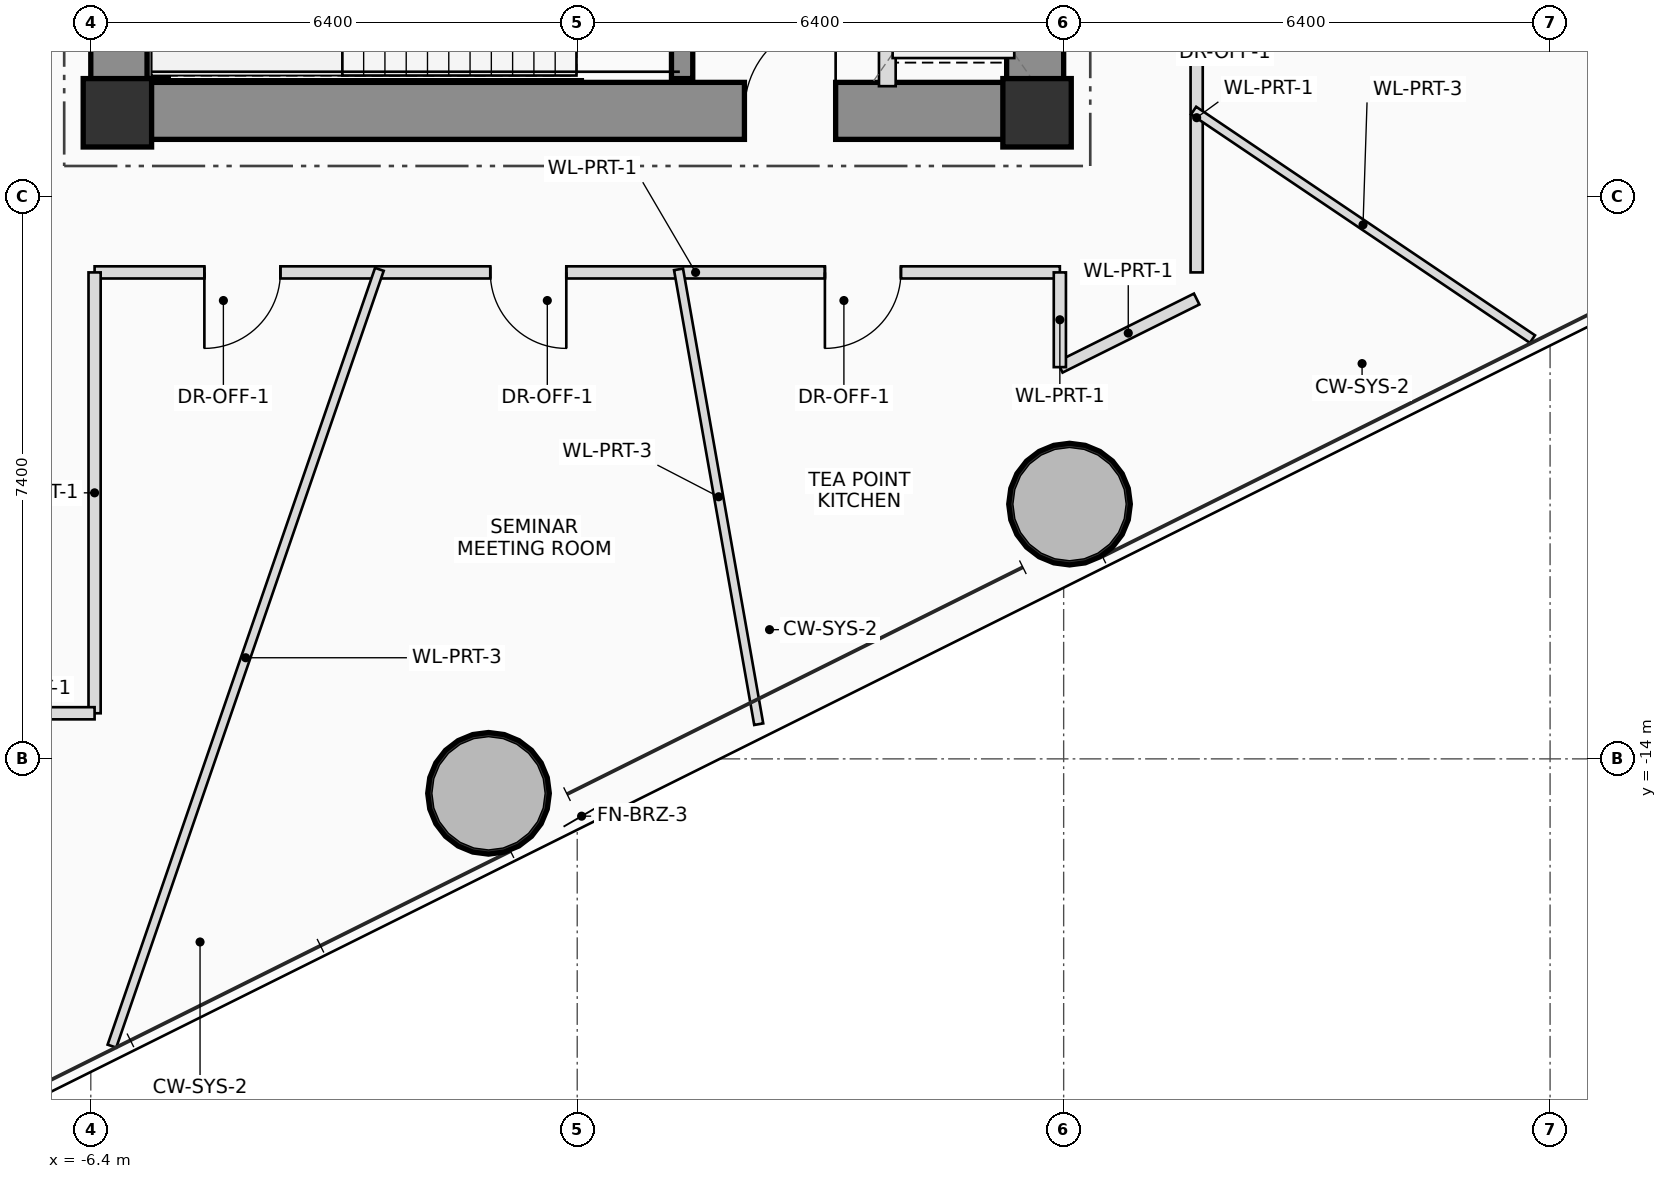
"""IFC4 building model, lengths in metres.
Left out: names, types, materials, properties, quantities, classifications, styles, units other than length and angle.
Written with IfcOpenShell. Run it as: python <this file> out.ifc"""

import sys

from ifc_helpers import new_model, si_unit, direction, frame, frame_2d, origin, origin_2d, place, context, subcontext, project, spatial, rectangle, hollow_circle, extrude, source, transform, mapped, element, fill, save


model = new_model("IFC4")
c1 = context("Model", 3, precision=1e-05, world=origin(), true_north=direction((0.0, 1.0)))
c2 = subcontext(c1, "Body", "Model", "MODEL_VIEW")
j1 = project(units=[si_unit("LENGTHUNIT", "METRE"), si_unit("PLANEANGLEUNIT", "RADIAN")], contexts=[c1])
p1 = place(None, origin())
s1 = spatial("IfcSite", under=j1, at=p1, CompositionType="ELEMENT")
p2 = place(p1, origin())
s2 = spatial("IfcBuilding", under=s1, at=p2, CompositionType="ELEMENT")
p3 = place(p2, frame((0.0, 0.0, 46.0)))
s3 = spatial("IfcBuildingStorey", under=s2, at=p3, CompositionType="ELEMENT", Elevation=46.0)
m1 = source(origin(), c2, "Body", "SweptSolid", [
    extrude(rectangle(XDim=0.9, YDim=0.9, at=origin_2d()), origin(), (0.0, 0.0, 1.0), 3.7),
])
for number, where, z_axis, x_axis in (
    (1, (-6.05, -5.5, 0.0), (0.0, 0.0, 1.0), (1.0, 0.0, 0.0)),
    (2, (6.05, -5.5, 0.0), (0.0, 0.0, 1.0), (1.0, 0.0, 0.0)),
):
    element("IfcColumn", number, at=place(p3, frame(where, z_axis=z_axis, x_axis=x_axis)), inside=s3, PredefinedType="COLUMN", context=c2, shape_type="MappedRepresentation", body=[
        mapped(m1, transform((0.0, 0.0, 0.0), scale=1.0)),
    ])
p4 = place(p3, frame((-6.4, -5.475, 0.0), z_axis=(0.0, 0.0, 1.0), x_axis=(1.0, 0.0, 0.0)))
e3 = element("IfcWall", 3, at=p4, inside=s3, PredefinedType="SHEAR", context=c2, shape_type="SweptSolid", body=[
    extrude(rectangle(XDim=12.8, YDim=0.75, at=frame_2d((6.4, 0.0))), origin(), (0.0, 0.0, 1.0), 3.7),
])
p5 = place(p4, frame((8.6, 0.0, 0.0)))
e4 = element("IfcOpeningElement", 4, at=p5, cuts=e3, PredefinedType="OPENING", context=c2, shape_type="SweptSolid", body=[
    extrude(rectangle(XDim=1.2, YDim=2.2, at=frame_2d((0.6, 1.1))), frame((0.0, 0.385, 0.0), z_axis=(0.0, -1.0, 0.0), x_axis=(1.0, 0.0, 0.0)), (0.0, 0.0, 1.0), 0.77),
])
p6 = place(p3, frame((6.025, -5.1, 0.0), z_axis=(0.0, 0.0, 1.0), x_axis=(0.0, 1.0, 0.0)))
e5 = element("IfcWall", 5, at=p6, inside=s3, PredefinedType="SHEAR", context=c2, shape_type="SweptSolid", body=[
    extrude(rectangle(XDim=10.2, YDim=0.75, at=frame_2d((5.1, 0.0))), origin(), (0.0, 0.0, 1.0), 3.7),
])
p7 = place(p3, frame((-6.025, -5.1, 0.0), z_axis=(0.0, 0.0, 1.0), x_axis=(0.0, 1.0, 0.0)))
e6 = element("IfcWall", 6, at=p7, inside=s3, PredefinedType="SHEAR", context=c2, shape_type="SweptSolid", body=[
    extrude(rectangle(XDim=3.35, YDim=0.75, at=frame_2d((1.675, 0.0))), origin(), (0.0, 0.0, 1.0), 3.7),
])
p8 = place(p3, frame((-5.52, -5.05, 0.0), z_axis=(0.0, 0.0, 1.0), x_axis=(0.0, 1.0, 0.0)))
e7 = element("IfcWall", 7, at=p8, inside=s3, PredefinedType="SHEAR", context=c2, shape_type="SweptSolid", body=[
    extrude(rectangle(XDim=2.75, YDim=0.28, at=frame_2d((1.375, 0.0))), origin(), (0.0, 0.0, 1.0), 3.7),
])
p9 = place(p3, frame((1.38, -5.05, 0.0), z_axis=(0.0, 0.0, 1.0), x_axis=(0.0, 1.0, 0.0)))
e8 = element("IfcWall", 8, at=p9, inside=s3, PredefinedType="SHEAR", context=c2, shape_type="SweptSolid", body=[
    extrude(rectangle(XDim=0.8, YDim=0.28, at=frame_2d((0.4, 0.0))), origin(), (0.0, 0.0, 1.0), 3.7),
])
m2 = source(origin(), c2, "Body", "SweptSolid", [
    extrude(hollow_circle(Radius=0.8, WallThickness=0.055, at=origin_2d()), origin(), (0.0, 0.0, 1.0), 3.7),
])
for number, where, z_axis, x_axis in (
    (9, (-1.167, -14.453, 0.0), (0.0, 0.0, 1.0), (1.0, 0.0, 0.0)),
    (10, (6.477, -10.648, 0.0), (0.0, 0.0, 1.0), (1.0, 0.0, 0.0)),
):
    element("IfcColumn", number, at=place(p3, frame(where, z_axis=z_axis, x_axis=x_axis)), inside=s3, PredefinedType="COLUMN", context=c2, shape_type="MappedRepresentation", body=[
        mapped(m2, transform((0.0, 0.0, 0.0), scale=1.0)),
    ])
p10 = place(p3, frame((4.08, -5.15, 0.0), z_axis=(0.0, 0.0, 1.0), x_axis=(0.0, 1.0, 0.0)))
e11 = element("IfcWall", 11, at=p10, inside=s3, PredefinedType="PLUMBINGWALL", context=c2, shape_type="SweptSolid", body=[
    extrude(rectangle(XDim=2.95, YDim=0.22, at=frame_2d((1.475, 0.0))), origin(), (0.0, 0.0, 1.0), 3.46),
])
p11 = place(p10, frame((0.95, 0.0, 0.0)))
e12 = element("IfcOpeningElement", 12, at=p11, cuts=e11, PredefinedType="OPENING", context=c2, shape_type="SweptSolid", body=[
    extrude(rectangle(XDim=1.2, YDim=2.25, at=frame_2d((0.6, 1.125))), frame((0.0, 0.12, 0.0), z_axis=(0.0, -1.0, 0.0), x_axis=(1.0, 0.0, 0.0)), (0.0, 0.0, 1.0), 0.24),
])
p12 = place(p3, frame((6.35, -7.6, 0.0), z_axis=(0.0, 0.0, 1.0), x_axis=(-1.0, 0.0, 0.0)))
e13 = element("IfcWall", 13, at=p12, inside=s3, PredefinedType="PARTITIONING", context=c2, shape_type="SweptSolid", body=[
    extrude(rectangle(XDim=12.7, YDim=0.16, at=frame_2d((6.35, 0.0))), origin(), (0.0, 0.0, 1.0), 2.765),
])
p13 = place(p12, frame((2.091, 0.0, 0.0)))
e14 = element("IfcOpeningElement", 14, at=p13, cuts=e13, PredefinedType="OPENING", context=c2, shape_type="SweptSolid", body=[
    extrude(rectangle(XDim=1.0, YDim=2.25, at=frame_2d((0.5, 1.125))), frame((0.0, 0.09, 0.0), z_axis=(0.0, -1.0, 0.0), x_axis=(1.0, 0.0, 0.0)), (0.0, 0.0, 1.0), 0.18),
])
p14 = place(p12, frame((6.494, 0.0, 0.0)))
e15 = element("IfcOpeningElement", 15, at=p14, cuts=e13, PredefinedType="OPENING", context=c2, shape_type="SweptSolid", body=[
    extrude(rectangle(XDim=1.0, YDim=2.25, at=frame_2d((0.5, 1.125))), frame((0.0, 0.09, 0.0), z_axis=(0.0, -1.0, 0.0), x_axis=(1.0, 0.0, 0.0)), (0.0, 0.0, 1.0), 0.18),
])
p15 = place(p12, frame((10.256, 0.0, 0.0)))
e16 = element("IfcOpeningElement", 16, at=p15, cuts=e13, PredefinedType="OPENING", context=c2, shape_type="SweptSolid", body=[
    extrude(rectangle(XDim=1.0, YDim=2.25, at=frame_2d((0.5, 1.125))), frame((0.0, 0.09, 0.0), z_axis=(0.0, -1.0, 0.0), x_axis=(1.0, 0.0, 0.0)), (0.0, 0.0, 1.0), 0.18),
])
p16 = place(p3, frame((-6.35, -7.6, 0.0), z_axis=(0.0, 0.0, 1.0), x_axis=(0.0, -1.0, 0.0)))
e17 = element("IfcWall", 17, at=p16, inside=s3, PredefinedType="PARTITIONING", context=c2, shape_type="SweptSolid", body=[
    extrude(rectangle(XDim=5.8, YDim=0.16, at=frame_2d((2.9, 0.0))), origin(), (0.0, 0.0, 1.0), 2.765),
])
p17 = place(p3, frame((-6.35, -13.4, 0.0), z_axis=(0.0, 0.0, 1.0), x_axis=(-1.0, 0.0, 0.0)))
e18 = element("IfcWall", 18, at=p17, inside=s3, PredefinedType="PARTITIONING", context=c2, shape_type="SweptSolid", body=[
    extrude(rectangle(XDim=1.8, YDim=0.16, at=frame_2d((0.9, 0.0))), origin(), (0.0, 0.0, 1.0), 2.765),
])
p18 = place(p3, frame((8.15, -0.02, 0.0), z_axis=(0.0, 0.0, 1.0), x_axis=(0.0, -1.0, 0.0)))
e19 = element("IfcWall", 19, at=p18, inside=s3, PredefinedType="PARTITIONING", context=c2, shape_type="SweptSolid", body=[
    extrude(rectangle(XDim=7.58, YDim=0.16, at=frame_2d((3.79, 0.0))), origin(), (0.0, 0.0, 1.0), 2.765),
])
p19 = place(p18, frame((2.359, 0.0, 0.0)))
e20 = element("IfcOpeningElement", 20, at=p19, cuts=e19, PredefinedType="OPENING", context=c2, shape_type="SweptSolid", body=[
    extrude(rectangle(XDim=1.0, YDim=2.25, at=frame_2d((0.5, 1.125))), frame((0.0, 0.09, 0.0), z_axis=(0.0, -1.0, 0.0), x_axis=(1.0, 0.0, 0.0)), (0.0, 0.0, 1.0), 0.18),
])
p20 = place(p3, frame((8.15, -7.95, 0.0), z_axis=(0.0, 0.0, 1.0), x_axis=(-0.895251454268, -0.445561256879, 0.0)))
e21 = element("IfcWall", 21, at=p20, inside=s3, PredefinedType="PARTITIONING", context=c2, shape_type="SweptSolid", body=[
    extrude(rectangle(XDim=2.01, YDim=0.16, at=frame_2d((1.005, 0.0))), origin(), (0.0, 0.0, 1.0), 2.765),
])
p21 = place(p3, frame((6.35, -8.846, 0.0), z_axis=(0.0, 0.0, 1.0), x_axis=(0.0, 1.0, 0.0)))
e22 = element("IfcWall", 22, at=p21, inside=s3, PredefinedType="PARTITIONING", context=c2, shape_type="SweptSolid", body=[
    extrude(rectangle(XDim=1.246, YDim=0.16, at=frame_2d((0.623, 0.0))), origin(), (0.0, 0.0, 1.0), 2.765),
])
p22 = place(p3, frame((-2.603, -7.56, 0.0), z_axis=(0.0, 0.0, 1.0), x_axis=(-0.325570875914, -0.945517638522, 0.0)))
e23 = element("IfcWall", 23, at=p22, inside=s3, PredefinedType="PARTITIONING", context=c2, shape_type="SweptSolid", body=[
    extrude(rectangle(XDim=10.808, YDim=0.12, at=frame_2d((5.404, 0.0))), origin(), (0.0, 0.0, 1.0), 2.765),
])
p23 = place(p3, frame((1.333, -7.56, 0.0), z_axis=(0.0, 0.0, 1.0), x_axis=(0.173663844644, -0.984804990373, 0.0)))
e24 = element("IfcWall", 24, at=p23, inside=s3, PredefinedType="PARTITIONING", context=c2, shape_type="SweptSolid", body=[
    extrude(rectangle(XDim=6.076, YDim=0.12, at=frame_2d((3.038, 0.0))), origin(), (0.0, 0.0, 1.0), 2.925),
])
p24 = place(p3, frame((8.11, -5.47, 0.0), z_axis=(0.0, 0.0, 1.0), x_axis=(0.829034436431, -0.559197552938, 0.0)))
e25 = element("IfcWall", 25, at=p24, inside=s3, PredefinedType="PARTITIONING", context=c2, shape_type="SweptSolid", body=[
    extrude(rectangle(XDim=5.377, YDim=0.12, at=frame_2d((2.688, 0.0))), origin(), (0.0, 0.0, 1.0), 2.765),
])
p25 = place(p5, origin())
e26 = element("IfcDoor", 26, at=p25, inside=s3, OperationType="SINGLE_SWING_RIGHT", PredefinedType="DOOR", context=c2, shape_type="SweptSolid", body=[
    extrude(rectangle(XDim=1.2, YDim=2.2, at=frame_2d((0.6, 1.1))), frame((0.0, 0.025, 0.0), z_axis=(0.0, -1.0, 0.0), x_axis=(1.0, 0.0, 0.0)), (0.0, 0.0, 1.0), 0.05),
])
fill(e4, e26)
p26 = place(p13, origin())
e27 = element("IfcDoor", 27, at=p26, inside=s3, OperationType="SINGLE_SWING_RIGHT", PredefinedType="DOOR", context=c2, shape_type="SweptSolid", body=[
    extrude(rectangle(XDim=1.0, YDim=2.25, at=frame_2d((0.5, 1.125))), frame((0.0, 0.025, 0.0), z_axis=(0.0, -1.0, 0.0), x_axis=(1.0, 0.0, 0.0)), (0.0, 0.0, 1.0), 0.05),
])
fill(e14, e27)
p27 = place(p14, origin())
e28 = element("IfcDoor", 28, at=p27, inside=s3, OperationType="SINGLE_SWING_LEFT", PredefinedType="DOOR", context=c2, shape_type="SweptSolid", body=[
    extrude(rectangle(XDim=1.0, YDim=2.25, at=frame_2d((0.5, 1.125))), frame((0.0, 0.025, 0.0), z_axis=(0.0, -1.0, 0.0), x_axis=(1.0, 0.0, 0.0)), (0.0, 0.0, 1.0), 0.05),
])
fill(e15, e28)
p28 = place(p15, origin())
e29 = element("IfcDoor", 29, at=p28, inside=s3, OperationType="SINGLE_SWING_RIGHT", PredefinedType="DOOR", context=c2, shape_type="SweptSolid", body=[
    extrude(rectangle(XDim=1.0, YDim=2.25, at=frame_2d((0.5, 1.125))), frame((0.0, 0.025, 0.0), z_axis=(0.0, -1.0, 0.0), x_axis=(1.0, 0.0, 0.0)), (0.0, 0.0, 1.0), 0.05),
])
fill(e16, e29)
save(model, sys.argv[1])
